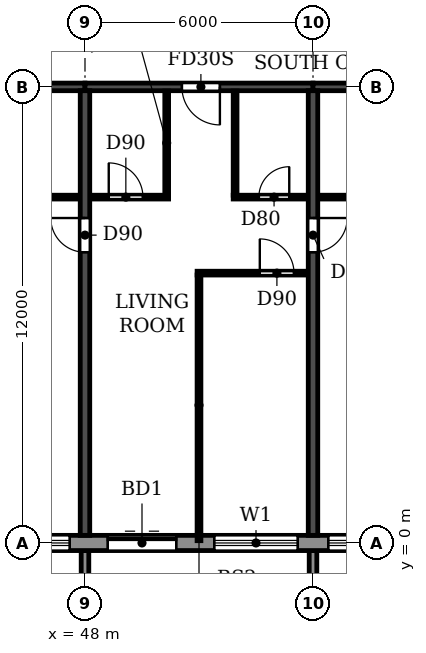
"""IFC4 building model, lengths in metres.
Left out: names, types, materials, properties, quantities, classifications, styles, units other than length and angle.
Written with IfcOpenShell. Run it as: python <this file> out.ifc"""

import sys

from ifc_helpers import new_model, si_unit, direction, frame, frame_2d, origin, place, context, subcontext, project, spatial, polyline, rectangle, outline, extrude, source, transform, mapped, element, fill, save


model = new_model("IFC4")
c1 = context("Model", 3, precision=1e-05, world=origin(), true_north=direction((0.0, 1.0)))
c2 = subcontext(c1, "Body", "Model", "MODEL_VIEW")
j1 = project(units=[si_unit("LENGTHUNIT", "METRE"), si_unit("PLANEANGLEUNIT", "RADIAN")], contexts=[c1])
p1 = place(None, origin())
s1 = spatial("IfcSite", under=j1, at=p1, CompositionType="ELEMENT")
p2 = place(p1, origin())
s2 = spatial("IfcBuilding", under=s1, at=p2, CompositionType="ELEMENT")
p3 = place(p2, frame((0.0, 0.0, 221.4)))
s3 = spatial("IfcBuildingStorey", under=s2, at=p3, CompositionType="ELEMENT", Elevation=221.4)
p4 = place(p3, frame((48.0, 0.2, 0.0), z_axis=(0.0, 0.0, 1.0), x_axis=(0.0, 1.0, 0.0)))
e1 = element("IfcWall", 1, at=p4, inside=s3, PredefinedType="SHEAR", context=c2, shape_type="SweptSolid", body=[
    extrude(rectangle(XDim=11.7, YDim=0.25, at=frame_2d((5.85, 0.0))), origin(), (0.0, 0.0, 1.0), 3.08),
])
p5 = place(p4, frame((7.45, 0.0, 0.0)))
e2 = element("IfcOpeningElement", 2, at=p5, cuts=e1, PredefinedType="OPENING", context=c2, shape_type="SweptSolid", body=[
    extrude(rectangle(XDim=0.9, YDim=2.1, at=frame_2d((0.45, 1.05))), frame((0.0, 0.135, 0.0), z_axis=(0.0, -1.0, 0.0), x_axis=(1.0, 0.0, 0.0)), (0.0, 0.0, 1.0), 0.27),
])
p6 = place(p3, frame((54.0, 0.2, 0.0), z_axis=(0.0, 0.0, 1.0), x_axis=(0.0, 1.0, 0.0)))
e3 = element("IfcWall", 3, at=p6, inside=s3, PredefinedType="SHEAR", context=c2, shape_type="SweptSolid", body=[
    extrude(rectangle(XDim=11.7, YDim=0.25, at=frame_2d((5.85, 0.0))), origin(), (0.0, 0.0, 1.0), 3.08),
])
p7 = place(p6, frame((7.45, 0.0, 0.0)))
e4 = element("IfcOpeningElement", 4, at=p7, cuts=e3, PredefinedType="OPENING", context=c2, shape_type="SweptSolid", body=[
    extrude(rectangle(XDim=0.9, YDim=2.1, at=frame_2d((0.45, 1.05))), frame((0.0, 0.135, 0.0), z_axis=(0.0, -1.0, 0.0), x_axis=(1.0, 0.0, 0.0)), (0.0, 0.0, 1.0), 0.27),
])
p8 = place(p3, frame((42.0, 12.0, 0.0), z_axis=(0.0, 0.0, 1.0), x_axis=(1.0, 0.0, 0.0)))
e5 = element("IfcWall", 5, at=p8, inside=s3, PredefinedType="SHEAR", context=c2, shape_type="SweptSolid", body=[
    extrude(rectangle(XDim=6.0, YDim=0.2, at=frame_2d((3.0, 0.0))), origin(), (0.0, 0.0, 1.0), 2.48),
])
p9 = place(p3, frame((48.0, 12.0, 0.0), z_axis=(0.0, 0.0, 1.0), x_axis=(1.0, 0.0, 0.0)))
e6 = element("IfcWall", 6, at=p9, inside=s3, PredefinedType="SHEAR", context=c2, shape_type="SweptSolid", body=[
    extrude(rectangle(XDim=6.0, YDim=0.2, at=frame_2d((3.0, 0.0))), origin(), (0.0, 0.0, 1.0), 2.48),
])
p10 = place(p9, frame((2.55, 0.0, 0.0)))
e7 = element("IfcOpeningElement", 7, at=p10, cuts=e6, PredefinedType="OPENING", context=c2, shape_type="SweptSolid", body=[
    extrude(rectangle(XDim=1.0, YDim=2.1, at=frame_2d((0.5, 1.05))), frame((0.0, 0.11, 0.0), z_axis=(0.0, -1.0, 0.0), x_axis=(1.0, 0.0, 0.0)), (0.0, 0.0, 1.0), 0.22),
])
p11 = place(p3, frame((54.0, 12.0, 0.0), z_axis=(0.0, 0.0, 1.0), x_axis=(1.0, 0.0, 0.0)))
e8 = element("IfcWall", 8, at=p11, inside=s3, PredefinedType="SHEAR", context=c2, shape_type="SweptSolid", body=[
    extrude(rectangle(XDim=6.0, YDim=0.2, at=frame_2d((3.0, 0.0))), origin(), (0.0, 0.0, 1.0), 2.48),
])
p12 = place(p3, frame((22.683, 0.0, 0.0), z_axis=(0.0, 0.0, 1.0), x_axis=(1.0, 0.0, 0.0)))
e9 = element("IfcWall", 9, at=p12, inside=s3, PredefinedType="STANDARD", context=c2, shape_type="SweptSolid", body=[
    extrude(rectangle(XDim=56.634, YDim=0.4, at=frame_2d((28.317, 0.0))), origin(), (0.0, 0.0, 1.0), 3.08),
])
p13 = place(p12, frame((1.717, 0.0, 0.9)))
e10 = element("IfcOpeningElement", 10, at=p13, cuts=e9, PredefinedType="OPENING", context=c2, shape_type="SweptSolid", body=[
    extrude(rectangle(XDim=2.2, YDim=1.5, at=frame_2d((1.1, 0.75))), frame((0.0, 0.21, 0.0), z_axis=(0.0, -1.0, 0.0), x_axis=(1.0, 0.0, 0.0)), (0.0, 0.0, 1.0), 0.42),
])
p14 = place(p12, frame((4.917, 0.0, 0.0)))
e11 = element("IfcOpeningElement", 11, at=p14, cuts=e9, PredefinedType="OPENING", context=c2, shape_type="SweptSolid", body=[
    extrude(rectangle(XDim=1.8, YDim=2.4, at=frame_2d((0.9, 1.2))), frame((0.0, 0.21, 0.0), z_axis=(0.0, -1.0, 0.0), x_axis=(1.0, 0.0, 0.0)), (0.0, 0.0, 1.0), 0.42),
])
p15 = place(p12, frame((7.717, 0.0, 0.9)))
e12 = element("IfcOpeningElement", 12, at=p15, cuts=e9, PredefinedType="OPENING", context=c2, shape_type="SweptSolid", body=[
    extrude(rectangle(XDim=2.2, YDim=1.5, at=frame_2d((1.1, 0.75))), frame((0.0, 0.21, 0.0), z_axis=(0.0, -1.0, 0.0), x_axis=(1.0, 0.0, 0.0)), (0.0, 0.0, 1.0), 0.42),
])
p16 = place(p12, frame((10.717, 0.0, 0.9)))
e13 = element("IfcOpeningElement", 13, at=p16, cuts=e9, PredefinedType="OPENING", context=c2, shape_type="SweptSolid", body=[
    extrude(rectangle(XDim=2.2, YDim=1.5, at=frame_2d((1.1, 0.75))), frame((0.0, 0.21, 0.0), z_axis=(0.0, -1.0, 0.0), x_axis=(1.0, 0.0, 0.0)), (0.0, 0.0, 1.0), 0.42),
])
p17 = place(p12, frame((13.717, 0.0, 0.9)))
e14 = element("IfcOpeningElement", 14, at=p17, cuts=e9, PredefinedType="OPENING", context=c2, shape_type="SweptSolid", body=[
    extrude(rectangle(XDim=2.2, YDim=1.5, at=frame_2d((1.1, 0.75))), frame((0.0, 0.21, 0.0), z_axis=(0.0, -1.0, 0.0), x_axis=(1.0, 0.0, 0.0)), (0.0, 0.0, 1.0), 0.42),
])
p18 = place(p12, frame((16.917, 0.0, 0.0)))
e15 = element("IfcOpeningElement", 15, at=p18, cuts=e9, PredefinedType="OPENING", context=c2, shape_type="SweptSolid", body=[
    extrude(rectangle(XDim=1.8, YDim=2.4, at=frame_2d((0.9, 1.2))), frame((0.0, 0.21, 0.0), z_axis=(0.0, -1.0, 0.0), x_axis=(1.0, 0.0, 0.0)), (0.0, 0.0, 1.0), 0.42),
])
p19 = place(p12, frame((19.717, 0.0, 0.9)))
e16 = element("IfcOpeningElement", 16, at=p19, cuts=e9, PredefinedType="OPENING", context=c2, shape_type="SweptSolid", body=[
    extrude(rectangle(XDim=2.2, YDim=1.5, at=frame_2d((1.1, 0.75))), frame((0.0, 0.21, 0.0), z_axis=(0.0, -1.0, 0.0), x_axis=(1.0, 0.0, 0.0)), (0.0, 0.0, 1.0), 0.42),
])
p20 = place(p12, frame((22.717, 0.0, 0.9)))
e17 = element("IfcOpeningElement", 17, at=p20, cuts=e9, PredefinedType="OPENING", context=c2, shape_type="SweptSolid", body=[
    extrude(rectangle(XDim=2.2, YDim=1.5, at=frame_2d((1.1, 0.75))), frame((0.0, 0.21, 0.0), z_axis=(0.0, -1.0, 0.0), x_axis=(1.0, 0.0, 0.0)), (0.0, 0.0, 1.0), 0.42),
])
p21 = place(p12, frame((25.917, 0.0, 0.0)))
e18 = element("IfcOpeningElement", 18, at=p21, cuts=e9, PredefinedType="OPENING", context=c2, shape_type="SweptSolid", body=[
    extrude(rectangle(XDim=1.8, YDim=2.4, at=frame_2d((0.9, 1.2))), frame((0.0, 0.21, 0.0), z_axis=(0.0, -1.0, 0.0), x_axis=(1.0, 0.0, 0.0)), (0.0, 0.0, 1.0), 0.42),
])
p22 = place(p12, frame((28.717, 0.0, 0.9)))
e19 = element("IfcOpeningElement", 19, at=p22, cuts=e9, PredefinedType="OPENING", context=c2, shape_type="SweptSolid", body=[
    extrude(rectangle(XDim=2.2, YDim=1.5, at=frame_2d((1.1, 0.75))), frame((0.0, 0.21, 0.0), z_axis=(0.0, -1.0, 0.0), x_axis=(1.0, 0.0, 0.0)), (0.0, 0.0, 1.0), 0.42),
])
p23 = place(p12, frame((31.717, 0.0, 0.9)))
e20 = element("IfcOpeningElement", 20, at=p23, cuts=e9, PredefinedType="OPENING", context=c2, shape_type="SweptSolid", body=[
    extrude(rectangle(XDim=2.2, YDim=1.5, at=frame_2d((1.1, 0.75))), frame((0.0, 0.21, 0.0), z_axis=(0.0, -1.0, 0.0), x_axis=(1.0, 0.0, 0.0)), (0.0, 0.0, 1.0), 0.42),
])
p24 = place(p12, frame((34.717, 0.0, 0.9)))
e21 = element("IfcOpeningElement", 21, at=p24, cuts=e9, PredefinedType="OPENING", context=c2, shape_type="SweptSolid", body=[
    extrude(rectangle(XDim=2.2, YDim=1.5, at=frame_2d((1.1, 0.75))), frame((0.0, 0.21, 0.0), z_axis=(0.0, -1.0, 0.0), x_axis=(1.0, 0.0, 0.0)), (0.0, 0.0, 1.0), 0.42),
])
p25 = place(p12, frame((37.917, 0.0, 0.0)))
e22 = element("IfcOpeningElement", 22, at=p25, cuts=e9, PredefinedType="OPENING", context=c2, shape_type="SweptSolid", body=[
    extrude(rectangle(XDim=1.8, YDim=2.4, at=frame_2d((0.9, 1.2))), frame((0.0, 0.21, 0.0), z_axis=(0.0, -1.0, 0.0), x_axis=(1.0, 0.0, 0.0)), (0.0, 0.0, 1.0), 0.42),
])
p26 = place(p12, frame((40.717, 0.0, 0.9)))
e23 = element("IfcOpeningElement", 23, at=p26, cuts=e9, PredefinedType="OPENING", context=c2, shape_type="SweptSolid", body=[
    extrude(rectangle(XDim=2.2, YDim=1.5, at=frame_2d((1.1, 0.75))), frame((0.0, 0.21, 0.0), z_axis=(0.0, -1.0, 0.0), x_axis=(1.0, 0.0, 0.0)), (0.0, 0.0, 1.0), 0.42),
])
p27 = place(p12, frame((43.717, 0.0, 0.9)))
e24 = element("IfcOpeningElement", 24, at=p27, cuts=e9, PredefinedType="OPENING", context=c2, shape_type="SweptSolid", body=[
    extrude(rectangle(XDim=2.2, YDim=1.5, at=frame_2d((1.1, 0.75))), frame((0.0, 0.21, 0.0), z_axis=(0.0, -1.0, 0.0), x_axis=(1.0, 0.0, 0.0)), (0.0, 0.0, 1.0), 0.42),
])
p28 = place(p12, frame((46.717, 0.0, 0.9)))
e25 = element("IfcOpeningElement", 25, at=p28, cuts=e9, PredefinedType="OPENING", context=c2, shape_type="SweptSolid", body=[
    extrude(rectangle(XDim=2.2, YDim=1.5, at=frame_2d((1.1, 0.75))), frame((0.0, 0.21, 0.0), z_axis=(0.0, -1.0, 0.0), x_axis=(1.0, 0.0, 0.0)), (0.0, 0.0, 1.0), 0.42),
])
p29 = place(p12, frame((49.917, 0.0, 0.0)))
e26 = element("IfcOpeningElement", 26, at=p29, cuts=e9, PredefinedType="OPENING", context=c2, shape_type="SweptSolid", body=[
    extrude(rectangle(XDim=1.8, YDim=2.4, at=frame_2d((0.9, 1.2))), frame((0.0, 0.21, 0.0), z_axis=(0.0, -1.0, 0.0), x_axis=(1.0, 0.0, 0.0)), (0.0, 0.0, 1.0), 0.42),
])
p30 = place(p12, frame((52.717, 0.0, 0.9)))
e27 = element("IfcOpeningElement", 27, at=p30, cuts=e9, PredefinedType="OPENING", context=c2, shape_type="SweptSolid", body=[
    extrude(rectangle(XDim=2.2, YDim=1.5, at=frame_2d((1.1, 0.75))), frame((0.0, 0.21, 0.0), z_axis=(0.0, -1.0, 0.0), x_axis=(1.0, 0.0, 0.0)), (0.0, 0.0, 1.0), 0.42),
])
m1 = source(origin(), c2, "Body", "SweptSolid", [
    extrude(outline(polyline([(0.0, 0.0), (0.2, 0.0), (0.2, 1.65), (0.0, 1.65), (0.0, 0.0)])), origin(), (0.0, 0.0, 1.0), 3.1),
])
for number, where in (
    (28, (47.9, -1.85, 0.0)),
    (29, (53.9, -1.85, 0.0)),
):
    element("IfcWall", number, at=place(p3, frame(where)), inside=s3, PredefinedType="STANDARD", context=c2, shape_type="MappedRepresentation", body=[
        mapped(m1, transform((0.0, 0.0, 0.0))),
    ])
p31 = place(p3, frame((50.95, 7.1, 0.0), z_axis=(0.0, 0.0, 1.0), x_axis=(1.0, 0.0, 0.0)))
e30 = element("IfcWall", 30, at=p31, inside=s3, PredefinedType="PARTITIONING", context=c2, shape_type="SweptSolid", body=[
    extrude(rectangle(XDim=2.915, YDim=0.1, at=frame_2d((1.458, 0.0))), origin(), (0.0, 0.0, 1.0), 3.08),
])
p32 = place(p31, frame((1.65, 0.0, 0.0)))
e31 = element("IfcOpeningElement", 31, at=p32, cuts=e30, PredefinedType="OPENING", context=c2, shape_type="SweptSolid", body=[
    extrude(rectangle(XDim=0.9, YDim=2.1, at=frame_2d((0.45, 1.05))), frame((0.0, 0.06, 0.0), z_axis=(0.0, -1.0, 0.0), x_axis=(1.0, 0.0, 0.0)), (0.0, 0.0, 1.0), 0.12),
])
p33 = place(p3, frame((45.1, 9.1, 0.0), z_axis=(0.0, 0.0, 1.0), x_axis=(1.0, 0.0, 0.0)))
e32 = element("IfcWall", 32, at=p33, inside=s3, PredefinedType="PARTITIONING", context=c2, shape_type="SweptSolid", body=[
    extrude(rectangle(XDim=2.765, YDim=0.1, at=frame_2d((1.382, 0.0))), origin(), (0.0, 0.0, 1.0), 3.08),
])
p34 = place(p33, frame((1.0, 0.0, 0.0)))
e33 = element("IfcOpeningElement", 33, at=p34, cuts=e32, PredefinedType="OPENING", context=c2, shape_type="SweptSolid", body=[
    extrude(rectangle(XDim=0.8, YDim=2.1, at=frame_2d((0.4, 1.05))), frame((0.0, 0.06, 0.0), z_axis=(0.0, -1.0, 0.0), x_axis=(1.0, 0.0, 0.0)), (0.0, 0.0, 1.0), 0.12),
])
p35 = place(p3, frame((48.135, 9.1, 0.0), z_axis=(0.0, 0.0, 1.0), x_axis=(1.0, 0.0, 0.0)))
e34 = element("IfcWall", 34, at=p35, inside=s3, PredefinedType="PARTITIONING", context=c2, shape_type="SweptSolid", body=[
    extrude(rectangle(XDim=2.065, YDim=0.1, at=frame_2d((1.032, 0.0))), origin(), (0.0, 0.0, 1.0), 3.08),
])
p36 = place(p35, frame((0.49, 0.0, 0.0)))
e35 = element("IfcOpeningElement", 35, at=p36, cuts=e34, PredefinedType="OPENING", context=c2, shape_type="SweptSolid", body=[
    extrude(rectangle(XDim=0.9, YDim=2.1, at=frame_2d((0.45, 1.05))), frame((0.0, 0.06, 0.0), z_axis=(0.0, -1.0, 0.0), x_axis=(1.0, 0.0, 0.0)), (0.0, 0.0, 1.0), 0.12),
])
p37 = place(p3, frame((51.9, 9.1, 0.0), z_axis=(0.0, 0.0, 1.0), x_axis=(1.0, 0.0, 0.0)))
e36 = element("IfcWall", 36, at=p37, inside=s3, PredefinedType="PARTITIONING", context=c2, shape_type="SweptSolid", body=[
    extrude(rectangle(XDim=1.965, YDim=0.1, at=frame_2d((0.982, 0.0))), origin(), (0.0, 0.0, 1.0), 3.08),
])
p38 = place(p37, frame((0.675, 0.0, 0.0)))
e37 = element("IfcOpeningElement", 37, at=p38, cuts=e36, PredefinedType="OPENING", context=c2, shape_type="SweptSolid", body=[
    extrude(rectangle(XDim=0.8, YDim=2.1, at=frame_2d((0.4, 1.05))), frame((0.0, 0.06, 0.0), z_axis=(0.0, -1.0, 0.0), x_axis=(1.0, 0.0, 0.0)), (0.0, 0.0, 1.0), 0.12),
])
p39 = place(p3, frame((54.135, 9.1, 0.0), z_axis=(0.0, 0.0, 1.0), x_axis=(1.0, 0.0, 0.0)))
e38 = element("IfcWall", 38, at=p39, inside=s3, PredefinedType="PARTITIONING", context=c2, shape_type="SweptSolid", body=[
    extrude(rectangle(XDim=2.765, YDim=0.1, at=frame_2d((1.382, 0.0))), origin(), (0.0, 0.0, 1.0), 3.08),
])
p40 = place(p39, frame((0.965, 0.0, 0.0)))
e39 = element("IfcOpeningElement", 39, at=p40, cuts=e38, PredefinedType="OPENING", context=c2, shape_type="SweptSolid", body=[
    extrude(rectangle(XDim=0.8, YDim=2.1, at=frame_2d((0.4, 1.05))), frame((0.0, 0.06, 0.0), z_axis=(0.0, -1.0, 0.0), x_axis=(1.0, 0.0, 0.0)), (0.0, 0.0, 1.0), 0.12),
])
p41 = place(p3, frame((50.15, 9.15, 0.0), z_axis=(0.0, 0.0, 1.0), x_axis=(0.0, 1.0, 0.0)))
e40 = element("IfcWall", 40, at=p41, inside=s3, PredefinedType="PARTITIONING", context=c2, shape_type="SweptSolid", body=[
    extrude(rectangle(XDim=2.74, YDim=0.1, at=frame_2d((1.37, 0.0))), origin(), (0.0, 0.0, 1.0), 3.08),
])
p42 = place(p3, frame((51.0, 0.06, 0.0), z_axis=(0.0, 0.0, 1.0), x_axis=(0.0, 1.0, 0.0)))
e41 = element("IfcWall", 41, at=p42, inside=s3, PredefinedType="PARTITIONING", context=c2, shape_type="SweptSolid", body=[
    extrude(rectangle(XDim=6.99, YDim=0.1, at=frame_2d((3.495, 0.0))), origin(), (0.0, 0.0, 1.0), 3.08),
])
p43 = place(p3, frame((51.95, 9.15, 0.0), z_axis=(0.0, 0.0, 1.0), x_axis=(0.0, 1.0, 0.0)))
e42 = element("IfcWall", 42, at=p43, inside=s3, PredefinedType="PARTITIONING", context=c2, shape_type="SweptSolid", body=[
    extrude(rectangle(XDim=2.74, YDim=0.1, at=frame_2d((1.37, 0.0))), origin(), (0.0, 0.0, 1.0), 3.08),
])
p44 = place(p20, origin())
e43 = element("IfcWindow", 43, at=p44, inside=s3, PartitioningType="DOUBLE_PANEL_HORIZONTAL", PredefinedType="WINDOW", context=c2, shape_type="SweptSolid", body=[
    extrude(rectangle(XDim=2.2, YDim=1.5, at=frame_2d((1.1, 0.75))), frame((0.0, 0.03, 0.0), z_axis=(0.0, -1.0, 0.0), x_axis=(1.0, 0.0, 0.0)), (0.0, 0.0, 1.0), 0.06),
])
fill(e17, e43)
p45 = place(p21, origin())
e44 = element("IfcDoor", 44, at=p45, inside=s3, OperationType="DOUBLE_DOOR_SLIDING", PredefinedType="DOOR", context=c2, shape_type="SweptSolid", body=[
    extrude(rectangle(XDim=1.8, YDim=2.4, at=frame_2d((0.9, 1.2))), frame((0.0, 0.025, 0.0), z_axis=(0.0, -1.0, 0.0), x_axis=(1.0, 0.0, 0.0)), (0.0, 0.0, 1.0), 0.05),
])
fill(e18, e44)
p46 = place(p22, origin())
e45 = element("IfcWindow", 45, at=p46, inside=s3, PartitioningType="DOUBLE_PANEL_HORIZONTAL", PredefinedType="WINDOW", context=c2, shape_type="SweptSolid", body=[
    extrude(rectangle(XDim=2.2, YDim=1.5, at=frame_2d((1.1, 0.75))), frame((0.0, 0.03, 0.0), z_axis=(0.0, -1.0, 0.0), x_axis=(1.0, 0.0, 0.0)), (0.0, 0.0, 1.0), 0.06),
])
fill(e19, e45)
p47 = place(p23, origin())
e46 = element("IfcWindow", 46, at=p47, inside=s3, PartitioningType="DOUBLE_PANEL_HORIZONTAL", PredefinedType="WINDOW", context=c2, shape_type="SweptSolid", body=[
    extrude(rectangle(XDim=2.2, YDim=1.5, at=frame_2d((1.1, 0.75))), frame((0.0, 0.03, 0.0), z_axis=(0.0, -1.0, 0.0), x_axis=(1.0, 0.0, 0.0)), (0.0, 0.0, 1.0), 0.06),
])
fill(e20, e46)
p48 = place(p5, origin())
e47 = element("IfcDoor", 47, at=p48, inside=s3, OperationType="SINGLE_SWING_RIGHT", PredefinedType="DOOR", context=c2, shape_type="SweptSolid", body=[
    extrude(rectangle(XDim=0.9, YDim=2.1, at=frame_2d((0.45, 1.05))), frame((0.0, 0.025, 0.0), z_axis=(0.0, -1.0, 0.0), x_axis=(1.0, 0.0, 0.0)), (0.0, 0.0, 1.0), 0.05),
])
fill(e2, e47)
p49 = place(p36, origin())
e48 = element("IfcDoor", 48, at=p49, inside=s3, OperationType="SINGLE_SWING_LEFT", PredefinedType="DOOR", context=c2, shape_type="SweptSolid", body=[
    extrude(rectangle(XDim=0.9, YDim=2.1, at=frame_2d((0.45, 1.05))), frame((0.0, 0.025, 0.0), z_axis=(0.0, -1.0, 0.0), x_axis=(1.0, 0.0, 0.0)), (0.0, 0.0, 1.0), 0.05),
])
fill(e35, e48)
p50 = place(p10, frame((1.0, 0.0, 0.0), z_axis=(0.0, 0.0, 1.0), x_axis=(-1.0, 0.0, 0.0)))
e49 = element("IfcDoor", 49, at=p50, inside=s3, OperationType="SINGLE_SWING_LEFT", PredefinedType="DOOR", context=c2, shape_type="SweptSolid", body=[
    extrude(rectangle(XDim=1.0, YDim=2.1, at=frame_2d((0.5, 1.05))), frame((0.0, 0.025, 0.0), z_axis=(0.0, -1.0, 0.0), x_axis=(1.0, 0.0, 0.0)), (0.0, 0.0, 1.0), 0.05),
])
fill(e7, e49)
p51 = place(p38, origin())
e50 = element("IfcDoor", 50, at=p51, inside=s3, OperationType="SINGLE_SWING_RIGHT", PredefinedType="DOOR", context=c2, shape_type="SweptSolid", body=[
    extrude(rectangle(XDim=0.8, YDim=2.1, at=frame_2d((0.4, 1.05))), frame((0.0, 0.025, 0.0), z_axis=(0.0, -1.0, 0.0), x_axis=(1.0, 0.0, 0.0)), (0.0, 0.0, 1.0), 0.05),
])
fill(e37, e50)
p52 = place(p32, origin())
e51 = element("IfcDoor", 51, at=p52, inside=s3, OperationType="SINGLE_SWING_LEFT", PredefinedType="DOOR", context=c2, shape_type="SweptSolid", body=[
    extrude(rectangle(XDim=0.9, YDim=2.1, at=frame_2d((0.45, 1.05))), frame((0.0, 0.025, 0.0), z_axis=(0.0, -1.0, 0.0), x_axis=(1.0, 0.0, 0.0)), (0.0, 0.0, 1.0), 0.05),
])
fill(e31, e51)
p53 = place(p7, frame((0.9, 0.0, 0.0), z_axis=(0.0, 0.0, 1.0), x_axis=(-1.0, 0.0, 0.0)))
e52 = element("IfcDoor", 52, at=p53, inside=s3, OperationType="SINGLE_SWING_LEFT", PredefinedType="DOOR", context=c2, shape_type="SweptSolid", body=[
    extrude(rectangle(XDim=0.9, YDim=2.1, at=frame_2d((0.45, 1.05))), frame((0.0, 0.025, 0.0), z_axis=(0.0, -1.0, 0.0), x_axis=(1.0, 0.0, 0.0)), (0.0, 0.0, 1.0), 0.05),
])
fill(e4, e52)
save(model, sys.argv[1])
